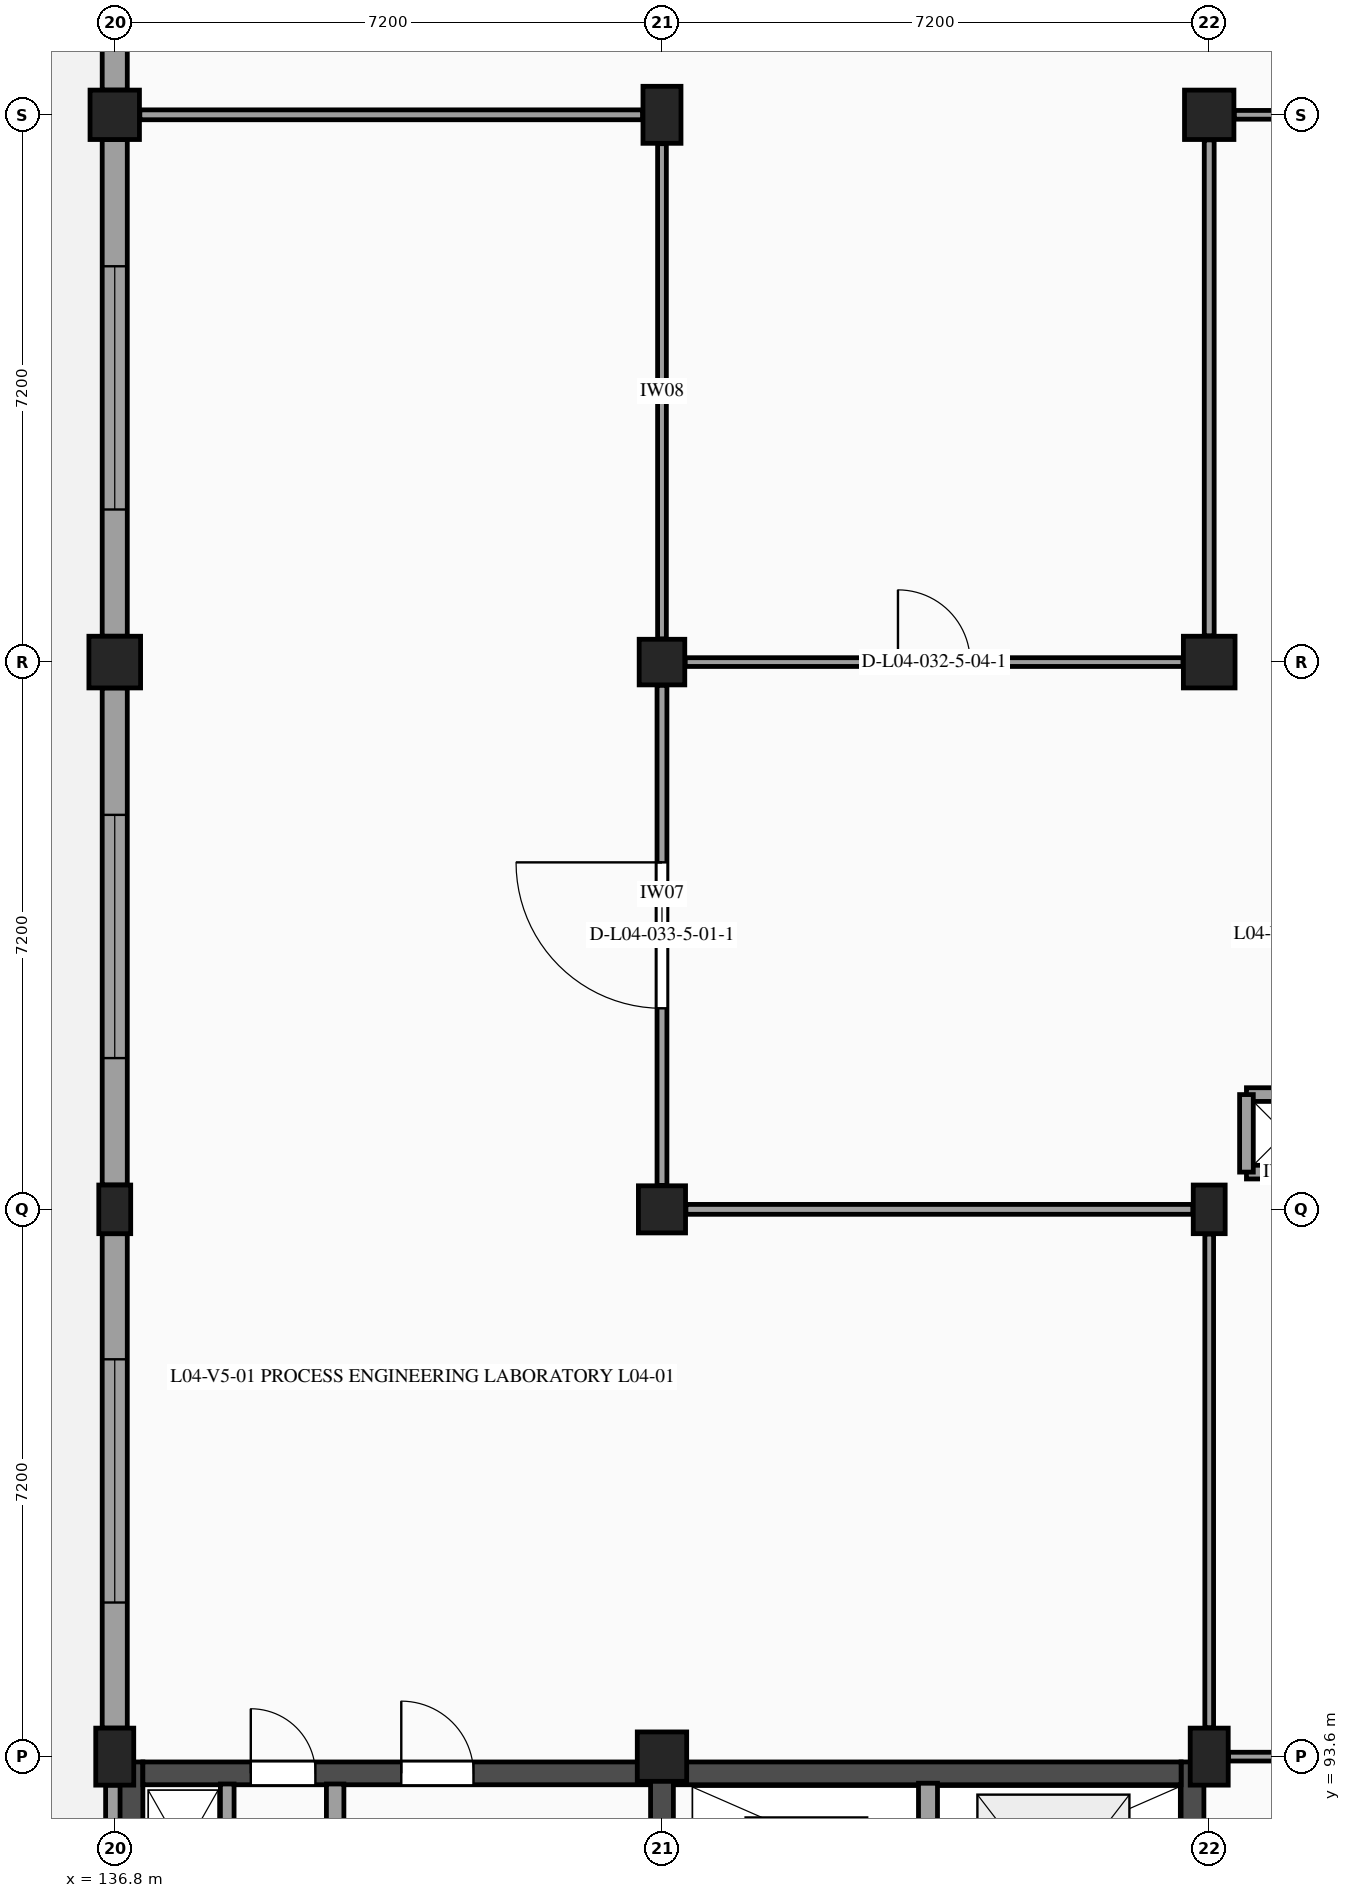
"""IFC4 building model, lengths in metres.
Left out: names, types, materials, properties, quantities, classifications, styles, units other than length and angle.
Written with IfcOpenShell. Run it as: python <this file> out.ifc"""

import sys

from ifc_helpers import new_model, si_unit, direction, frame, frame_2d, origin, origin_2d, place, context, subcontext, project, spatial, rectangle, extrude, element, fill, save


model = new_model("IFC4")
c1 = context("Model", 3, precision=1e-05, world=origin(), true_north=direction((0.0, 1.0)))
c2 = subcontext(c1, "Body", "Model", "MODEL_VIEW")
j1 = project(units=[si_unit("LENGTHUNIT", "METRE"), si_unit("PLANEANGLEUNIT", "RADIAN")], contexts=[c1])
p1 = place(None, origin())
s1 = spatial("IfcSite", under=j1, at=p1, CompositionType="ELEMENT")
p2 = place(p1, origin())
s2 = spatial("IfcBuilding", under=s1, at=p2, CompositionType="ELEMENT")
p3 = place(p2, frame((0.0, 0.0, 18.6)))
s3 = spatial("IfcBuildingStorey", under=s2, at=p3, CompositionType="ELEMENT", Elevation=18.6)
p4 = place(p3, frame((136.8, 93.6, 0.0), z_axis=(0.0, 0.0, 1.0), x_axis=(1.0, 0.0, 0.0)))
e1 = element("IfcColumn", 1, at=p4, inside=s3, PredefinedType="COLUMN", context=c2, shape_type="SweptSolid", body=[
    extrude(rectangle(XDim=0.5, YDim=0.75, at=origin_2d()), origin(), (0.0, 0.0, 1.0), 4.2),
])
p5 = place(p3, frame((136.8, 100.8, 0.0), z_axis=(0.0, 0.0, 1.0), x_axis=(1.0, 0.0, 0.0)))
e2 = element("IfcColumn", 2, at=p5, inside=s3, PredefinedType="PILASTER", context=c2, shape_type="SweptSolid", body=[
    extrude(rectangle(XDim=0.42, YDim=0.64, at=origin_2d()), origin(), (0.0, 0.0, 1.0), 4.2),
])
p6 = place(p3, frame((136.8, 108.0, 0.0), z_axis=(0.0, 0.0, 1.0), x_axis=(1.0, 0.0, 0.0)))
e3 = element("IfcColumn", 3, at=p6, inside=s3, PredefinedType="COLUMN", context=c2, shape_type="SweptSolid", body=[
    extrude(rectangle(XDim=0.68, YDim=0.68, at=origin_2d()), origin(), (0.0, 0.0, 1.0), 4.2),
])
for number, where, z_axis, x_axis in (
    (4, (136.8, 115.2, 0.0), (0.0, 0.0, 1.0), (1.0, 0.0, 0.0)),
    (5, (144.0, 93.6, 0.0), (0.0, 0.0, 1.0), (1.0, 0.0, 0.0)),
):
    element("IfcColumn", number, at=place(p3, frame(where, z_axis=z_axis, x_axis=x_axis)), inside=s3, PredefinedType="COLUMN", context=c2, shape_type="SweptSolid", body=[
        extrude(rectangle(XDim=0.65, YDim=0.65, at=origin_2d()), origin(), (0.0, 0.0, 1.0), 4.2),
    ])
p7 = place(p3, frame((144.0, 100.8, 0.0), z_axis=(0.0, 0.0, 1.0), x_axis=(1.0, 0.0, 0.0)))
e6 = element("IfcColumn", 6, at=p7, inside=s3, PredefinedType="COLUMN", context=c2, shape_type="SweptSolid", body=[
    extrude(rectangle(XDim=0.62, YDim=0.62, at=origin_2d()), origin(), (0.0, 0.0, 1.0), 4.2),
])
p8 = place(p3, frame((144.0, 108.0, 0.0), z_axis=(0.0, 0.0, 1.0), x_axis=(1.0, 0.0, 0.0)))
e7 = element("IfcColumn", 7, at=p8, inside=s3, PredefinedType="COLUMN", context=c2, shape_type="SweptSolid", body=[
    extrude(rectangle(XDim=0.6, YDim=0.6, at=origin_2d()), origin(), (0.0, 0.0, 1.0), 4.2),
])
for number, where, z_axis, x_axis in (
    (8, (144.0, 115.2, 0.0), (0.0, 0.0, 1.0), (1.0, 0.0, 0.0)),
    (9, (151.2, 93.6, 0.0), (0.0, 0.0, 1.0), (1.0, 0.0, 0.0)),
):
    element("IfcColumn", number, at=place(p3, frame(where, z_axis=z_axis, x_axis=x_axis)), inside=s3, PredefinedType="COLUMN", context=c2, shape_type="SweptSolid", body=[
        extrude(rectangle(XDim=0.5, YDim=0.75, at=origin_2d()), origin(), (0.0, 0.0, 1.0), 4.2),
    ])
p9 = place(p3, frame((151.2, 100.8, 0.0), z_axis=(0.0, 0.0, 1.0), x_axis=(1.0, 0.0, 0.0)))
e10 = element("IfcColumn", 10, at=p9, inside=s3, PredefinedType="PILASTER", context=c2, shape_type="SweptSolid", body=[
    extrude(rectangle(XDim=0.42, YDim=0.64, at=origin_2d()), origin(), (0.0, 0.0, 1.0), 4.2),
])
p10 = place(p3, frame((151.2, 108.0, 0.0), z_axis=(0.0, 0.0, 1.0), x_axis=(1.0, 0.0, 0.0)))
e11 = element("IfcColumn", 11, at=p10, inside=s3, PredefinedType="COLUMN", context=c2, shape_type="SweptSolid", body=[
    extrude(rectangle(XDim=0.68, YDim=0.68, at=origin_2d()), origin(), (0.0, 0.0, 1.0), 4.2),
])
p11 = place(p3, frame((151.2, 115.2, 0.0), z_axis=(0.0, 0.0, 1.0), x_axis=(1.0, 0.0, 0.0)))
e12 = element("IfcColumn", 12, at=p11, inside=s3, PredefinedType="COLUMN", context=c2, shape_type="SweptSolid", body=[
    extrude(rectangle(XDim=0.65, YDim=0.65, at=origin_2d()), origin(), (0.0, 0.0, 1.0), 4.2),
])
p12 = place(p3, frame((136.8, 115.525, 0.0), z_axis=(0.0, 0.0, 1.0), x_axis=(0.0, 1.0, 0.0)))
e13 = element("IfcWall", 13, at=p12, inside=s3, PredefinedType="STANDARD", context=c2, shape_type="SweptSolid", body=[
    extrude(rectangle(XDim=6.565, YDim=0.33, at=frame_2d((3.283, 0.0))), origin(), (0.0, 0.0, 1.0), 3.16),
])
p13 = place(p12, frame((2.583, 0.0, 0.0)))
e14 = element("IfcOpeningElement", 14, at=p13, cuts=e13, PredefinedType="OPENING", context=c2, shape_type="SweptSolid", body=[
    extrude(rectangle(XDim=1.4, YDim=2.25, at=frame_2d((0.7, 1.125))), frame((0.0, 0.175, 0.0), z_axis=(0.0, -1.0, 0.0), x_axis=(1.0, 0.0, 0.0)), (0.0, 0.0, 1.0), 0.35),
])
p14 = place(p3, frame((136.8, 86.7, 0.0), z_axis=(0.0, 0.0, 1.0), x_axis=(0.0, 1.0, 0.0)))
e15 = element("IfcWall", 15, at=p14, inside=s3, PredefinedType="STANDARD", context=c2, shape_type="SweptSolid", body=[
    extrude(rectangle(XDim=6.525, YDim=0.24, at=frame_2d((3.263, 0.0))), origin(), (0.0, 0.0, 1.0), 3.16),
])
p15 = place(p3, frame((136.8, 93.975, 0.0), z_axis=(0.0, 0.0, 1.0), x_axis=(0.0, 1.0, 0.0)))
e16 = element("IfcWall", 16, at=p15, inside=s3, PredefinedType="STANDARD", context=c2, shape_type="SweptSolid", body=[
    extrude(rectangle(XDim=6.505, YDim=0.33, at=frame_2d((3.252, 0.0))), origin(), (0.0, 0.0, 1.0), 3.16),
])
p16 = place(p15, frame((1.653, 0.0, 0.95)))
e17 = element("IfcOpeningElement", 17, at=p16, cuts=e16, PredefinedType="OPENING", context=c2, shape_type="SweptSolid", body=[
    extrude(rectangle(XDim=3.2, YDim=1.45, at=frame_2d((1.6, 0.725))), frame((0.0, 0.175, 0.0), z_axis=(0.0, -1.0, 0.0), x_axis=(1.0, 0.0, 0.0)), (0.0, 0.0, 1.0), 0.35),
])
p17 = place(p3, frame((136.8, 101.12, 0.0), z_axis=(0.0, 0.0, 1.0), x_axis=(0.0, 1.0, 0.0)))
e18 = element("IfcWall", 18, at=p17, inside=s3, PredefinedType="STANDARD", context=c2, shape_type="SweptSolid", body=[
    extrude(rectangle(XDim=6.54, YDim=0.33, at=frame_2d((3.27, 0.0))), origin(), (0.0, 0.0, 1.0), 3.16),
])
p18 = place(p17, frame((1.67, 0.0, 0.95)))
e19 = element("IfcOpeningElement", 19, at=p18, cuts=e18, PredefinedType="OPENING", context=c2, shape_type="SweptSolid", body=[
    extrude(rectangle(XDim=3.2, YDim=1.45, at=frame_2d((1.6, 0.725))), frame((0.0, 0.175, 0.0), z_axis=(0.0, -1.0, 0.0), x_axis=(1.0, 0.0, 0.0)), (0.0, 0.0, 1.0), 0.35),
])
p19 = place(p3, frame((136.8, 108.34, 0.0), z_axis=(0.0, 0.0, 1.0), x_axis=(0.0, 1.0, 0.0)))
e20 = element("IfcWall", 20, at=p19, inside=s3, PredefinedType="STANDARD", context=c2, shape_type="SweptSolid", body=[
    extrude(rectangle(XDim=6.535, YDim=0.33, at=frame_2d((3.268, 0.0))), origin(), (0.0, 0.0, 1.0), 3.16),
])
p20 = place(p19, frame((1.667, 0.0, 0.95)))
e21 = element("IfcOpeningElement", 21, at=p20, cuts=e20, PredefinedType="OPENING", context=c2, shape_type="SweptSolid", body=[
    extrude(rectangle(XDim=3.2, YDim=1.45, at=frame_2d((1.6, 0.725))), frame((0.0, 0.175, 0.0), z_axis=(0.0, -1.0, 0.0), x_axis=(1.0, 0.0, 0.0)), (0.0, 0.0, 1.0), 0.35),
])
p21 = place(p3, frame((137.02, 93.53, 0.0), z_axis=(0.0, 0.0, 1.0), x_axis=(0.0, -1.0, 0.0)))
e22 = element("IfcWall", 22, at=p21, inside=s3, PredefinedType="SHEAR", context=c2, shape_type="SweptSolid", body=[
    extrude(rectangle(XDim=7.06, YDim=0.3, at=frame_2d((3.53, 0.0))), origin(), (0.0, 0.0, 1.0), 3.955),
])
p22 = place(p3, frame((137.17, 93.38, 0.0), z_axis=(0.0, 0.0, 1.0), x_axis=(1.0, 0.0, 0.0)))
e23 = element("IfcWall", 23, at=p22, inside=s3, PredefinedType="SHEAR", context=c2, shape_type="SweptSolid", body=[
    extrude(rectangle(XDim=6.68, YDim=0.3, at=frame_2d((3.34, 0.0))), origin(), (0.0, 0.0, 1.0), 3.955),
])
p23 = place(p22, frame((1.42, 0.0, 0.0)))
e24 = element("IfcOpeningElement", 24, at=p23, cuts=e23, PredefinedType="OPENING", context=c2, shape_type="SweptSolid", body=[
    extrude(rectangle(XDim=0.85, YDim=2.1, at=frame_2d((0.425, 1.05))), frame((0.0, 0.16, 0.0), z_axis=(0.0, -1.0, 0.0), x_axis=(1.0, 0.0, 0.0)), (0.0, 0.0, 1.0), 0.32),
])
p24 = place(p22, frame((3.4, 0.0, 0.0)))
e25 = element("IfcOpeningElement", 25, at=p24, cuts=e23, PredefinedType="OPENING", context=c2, shape_type="SweptSolid", body=[
    extrude(rectangle(XDim=0.95, YDim=2.15, at=frame_2d((0.475, 1.075))), frame((0.0, 0.16, 0.0), z_axis=(0.0, -1.0, 0.0), x_axis=(1.0, 0.0, 0.0)), (0.0, 0.0, 1.0), 0.32),
])
p25 = place(p3, frame((139.7, 91.5, 0.0), z_axis=(0.0, 0.0, 1.0), x_axis=(0.0, 1.0, 0.0)))
e26 = element("IfcWall", 26, at=p25, inside=s3, PredefinedType="PARTITIONING", context=c2, shape_type="SweptSolid", body=[
    extrude(rectangle(XDim=1.74, YDim=0.23, at=frame_2d((0.87, 0.0))), origin(), (0.0, 0.0, 1.0), 3.955),
])
p26 = place(p3, frame((138.28, 91.48, 0.0), z_axis=(0.0, 0.0, 1.0), x_axis=(0.0, 1.0, 0.0)))
e27 = element("IfcWall", 27, at=p26, inside=s3, PredefinedType="PARTITIONING", context=c2, shape_type="SweptSolid", body=[
    extrude(rectangle(XDim=1.76, YDim=0.18, at=frame_2d((0.88, 0.0))), origin(), (0.0, 0.0, 1.0), 3.955),
])
p27 = place(p3, frame((144.0, 86.47, 0.0), z_axis=(0.0, 0.0, 1.0), x_axis=(0.0, 1.0, 0.0)))
e28 = element("IfcWall", 28, at=p27, inside=s3, PredefinedType="SHEAR", context=c2, shape_type="SweptSolid", body=[
    extrude(rectangle(XDim=7.06, YDim=0.3, at=frame_2d((3.53, 0.0))), origin(), (0.0, 0.0, 1.0), 3.955),
])
p28 = place(p27, frame((1.4, 0.0, 0.0)))
e29 = element("IfcOpeningElement", 29, at=p28, cuts=e28, PredefinedType="OPENING", context=c2, shape_type="SweptSolid", body=[
    extrude(rectangle(XDim=1.8, YDim=2.2, at=frame_2d((0.9, 1.1))), frame((0.0, 0.16, 0.0), z_axis=(0.0, -1.0, 0.0), x_axis=(1.0, 0.0, 0.0)), (0.0, 0.0, 1.0), 0.32),
])
p29 = place(p3, frame((150.98, 86.47, 0.0), z_axis=(0.0, 0.0, 1.0), x_axis=(0.0, 1.0, 0.0)))
e30 = element("IfcWall", 30, at=p29, inside=s3, PredefinedType="SHEAR", context=c2, shape_type="SweptSolid", body=[
    extrude(rectangle(XDim=7.06, YDim=0.3, at=frame_2d((3.53, 0.0))), origin(), (0.0, 0.0, 1.0), 3.955),
])
p30 = place(p3, frame((144.15, 93.38, 0.0), z_axis=(0.0, 0.0, 1.0), x_axis=(1.0, 0.0, 0.0)))
e31 = element("IfcWall", 31, at=p30, inside=s3, PredefinedType="SHEAR", context=c2, shape_type="SweptSolid", body=[
    extrude(rectangle(XDim=6.68, YDim=0.3, at=frame_2d((3.34, 0.0))), origin(), (0.0, 0.0, 1.0), 3.955),
])
p31 = place(p3, frame((147.5, 90.38, 0.0), z_axis=(0.0, 0.0, 1.0), x_axis=(0.0, 1.0, 0.0)))
e32 = element("IfcWall", 32, at=p31, inside=s3, PredefinedType="PARTITIONING", context=c2, shape_type="SweptSolid", body=[
    extrude(rectangle(XDim=2.87, YDim=0.25, at=frame_2d((1.435, 0.0))), origin(), (0.0, 0.0, 1.0), 3.955),
])
for number, where, z_axis, x_axis in (
    (33, (151.69, 101.29, 0.0), (0.0, 0.0, 1.0), (1.0, 0.0, 0.0)),
    (34, (152.71, 102.31, 0.0), (0.0, 0.0, 1.0), (-1.0, 0.0, 0.0)),
    (35, (151.69, 102.31, 0.0), (0.0, 0.0, 1.0), (0.0, -1.0, 0.0)),
):
    element("IfcWall", number, at=place(p3, frame(where, z_axis=z_axis, x_axis=x_axis)), inside=s3, PredefinedType="PARTITIONING", context=c2, shape_type="SweptSolid", body=[
        extrude(rectangle(XDim=1.02, YDim=0.18, at=frame_2d((0.51, 0.0))), origin(), (0.0, 0.0, 1.0), 3.955),
    ])
p32 = place(p3, frame((144.0, 101.115, 0.0), z_axis=(0.0, 0.0, 1.0), x_axis=(0.0, 1.0, 0.0)))
e36 = element("IfcWall", 36, at=p32, inside=s3, PredefinedType="PARTITIONING", context=c2, shape_type="SweptSolid", body=[
    extrude(rectangle(XDim=6.58, YDim=0.13, at=frame_2d((3.29, 0.0))), origin(), (0.0, 0.0, 1.0), 3.27),
])
p33 = place(p32, frame((2.33, 0.0, 0.0)))
e37 = element("IfcOpeningElement", 37, at=p33, cuts=e36, PredefinedType="OPENING", context=c2, shape_type="SweptSolid", body=[
    extrude(rectangle(XDim=1.92, YDim=2.35, at=frame_2d((0.96, 1.175))), frame((0.0, 0.075, 0.0), z_axis=(0.0, -1.0, 0.0), x_axis=(1.0, 0.0, 0.0)), (0.0, 0.0, 1.0), 0.15),
])
p34 = place(p3, frame((144.0, 108.305, 0.0), z_axis=(0.0, 0.0, 1.0), x_axis=(0.0, 1.0, 0.0)))
e38 = element("IfcWall", 38, at=p34, inside=s3, PredefinedType="PARTITIONING", context=c2, shape_type="SweptSolid", body=[
    extrude(rectangle(XDim=6.515, YDim=0.115, at=frame_2d((3.258, 0.0))), origin(), (0.0, 0.0, 1.0), 3.27),
])
p35 = place(p3, frame((137.13, 115.2, 0.0), z_axis=(0.0, 0.0, 1.0), x_axis=(1.0, 0.0, 0.0)))
e39 = element("IfcWall", 39, at=p35, inside=s3, PredefinedType="PARTITIONING", context=c2, shape_type="SweptSolid", body=[
    extrude(rectangle(XDim=6.615, YDim=0.13, at=frame_2d((3.308, 0.0))), origin(), (0.0, 0.0, 1.0), 3.24),
])
p36 = place(p3, frame((151.2, 93.98, 0.0), z_axis=(0.0, 0.0, 1.0), x_axis=(0.0, 1.0, 0.0)))
e40 = element("IfcWall", 40, at=p36, inside=s3, PredefinedType="PARTITIONING", context=c2, shape_type="SweptSolid", body=[
    extrude(rectangle(XDim=6.495, YDim=0.115, at=frame_2d((3.248, 0.0))), origin(), (0.0, 0.0, 1.0), 3.275),
])
p37 = place(p3, frame((144.315, 100.8, 0.0), z_axis=(0.0, 0.0, 1.0), x_axis=(1.0, 0.0, 0.0)))
e41 = element("IfcWall", 41, at=p37, inside=s3, PredefinedType="PARTITIONING", context=c2, shape_type="SweptSolid", body=[
    extrude(rectangle(XDim=6.67, YDim=0.13, at=frame_2d((3.335, 0.0))), origin(), (0.0, 0.0, 1.0), 3.245),
])
p38 = place(p3, frame((144.305, 108.0, 0.0), z_axis=(0.0, 0.0, 1.0), x_axis=(1.0, 0.0, 0.0)))
e42 = element("IfcWall", 42, at=p38, inside=s3, PredefinedType="PARTITIONING", context=c2, shape_type="SweptSolid", body=[
    extrude(rectangle(XDim=6.55, YDim=0.115, at=frame_2d((3.275, 0.0))), origin(), (0.0, 0.0, 1.0), 3.245),
])
p39 = place(p38, frame((2.8, 0.0, 0.0)))
e43 = element("IfcOpeningElement", 43, at=p39, cuts=e42, PredefinedType="OPENING", context=c2, shape_type="SweptSolid", body=[
    extrude(rectangle(XDim=0.95, YDim=2.15, at=frame_2d((0.475, 1.075))), frame((0.0, 0.067, 0.0), z_axis=(0.0, -1.0, 0.0), x_axis=(1.0, 0.0, 0.0)), (0.0, 0.0, 1.0), 0.135),
])
p40 = place(p3, frame((151.2, 108.345, 0.0), z_axis=(0.0, 0.0, 1.0), x_axis=(0.0, 1.0, 0.0)))
e44 = element("IfcWall", 44, at=p40, inside=s3, PredefinedType="PARTITIONING", context=c2, shape_type="SweptSolid", body=[
    extrude(rectangle(XDim=6.525, YDim=0.13, at=frame_2d((3.263, 0.0))), origin(), (0.0, 0.0, 1.0), 3.27),
])
for number, where, z_axis, x_axis in (
    (45, (151.455, 93.6, 0.0), (0.0, 0.0, 1.0), (1.0, 0.0, 0.0)),
    (46, (151.53, 115.2, 0.0), (0.0, 0.0, 1.0), (1.0, 0.0, 0.0)),
):
    element("IfcWall", number, at=place(p3, frame(where, z_axis=z_axis, x_axis=x_axis)), inside=s3, PredefinedType="PARTITIONING", context=c2, shape_type="SweptSolid", body=[
        extrude(rectangle(XDim=6.615, YDim=0.115, at=frame_2d((3.308, 0.0))), origin(), (0.0, 0.0, 1.0), 3.265),
    ])
p41 = place(p16, origin())
e47 = element("IfcWindow", 47, at=p41, inside=s3, PartitioningType="SINGLE_PANEL", PredefinedType="WINDOW", context=c2, shape_type="SweptSolid", body=[
    extrude(rectangle(XDim=3.2, YDim=1.45, at=frame_2d((1.6, 0.725))), frame((0.0, 0.03, 0.0), z_axis=(0.0, -1.0, 0.0), x_axis=(1.0, 0.0, 0.0)), (0.0, 0.0, 1.0), 0.06),
])
fill(e17, e47)
p42 = place(p18, origin())
e48 = element("IfcWindow", 48, at=p42, inside=s3, PartitioningType="SINGLE_PANEL", PredefinedType="WINDOW", context=c2, shape_type="SweptSolid", body=[
    extrude(rectangle(XDim=3.2, YDim=1.45, at=frame_2d((1.6, 0.725))), frame((0.0, 0.03, 0.0), z_axis=(0.0, -1.0, 0.0), x_axis=(1.0, 0.0, 0.0)), (0.0, 0.0, 1.0), 0.06),
])
fill(e19, e48)
p43 = place(p20, origin())
e49 = element("IfcWindow", 49, at=p43, inside=s3, PartitioningType="SINGLE_PANEL", PredefinedType="WINDOW", context=c2, shape_type="SweptSolid", body=[
    extrude(rectangle(XDim=3.2, YDim=1.45, at=frame_2d((1.6, 0.725))), frame((0.0, 0.03, 0.0), z_axis=(0.0, -1.0, 0.0), x_axis=(1.0, 0.0, 0.0)), (0.0, 0.0, 1.0), 0.06),
])
fill(e21, e49)
p44 = place(p23, origin())
e50 = element("IfcDoor", 50, at=p44, inside=s3, OperationType="SINGLE_SWING_LEFT", PredefinedType="DOOR", context=c2, shape_type="SweptSolid", body=[
    extrude(rectangle(XDim=0.85, YDim=2.1, at=frame_2d((0.425, 1.05))), frame((0.0, 0.025, 0.0), z_axis=(0.0, -1.0, 0.0), x_axis=(1.0, 0.0, 0.0)), (0.0, 0.0, 1.0), 0.05),
])
fill(e24, e50)
p45 = place(p24, origin())
e51 = element("IfcDoor", 51, at=p45, inside=s3, OperationType="SINGLE_SWING_LEFT", PredefinedType="DOOR", context=c2, shape_type="SweptSolid", body=[
    extrude(rectangle(XDim=0.95, YDim=2.15, at=frame_2d((0.475, 1.075))), frame((0.0, 0.025, 0.0), z_axis=(0.0, -1.0, 0.0), x_axis=(1.0, 0.0, 0.0)), (0.0, 0.0, 1.0), 0.05),
])
fill(e25, e51)
p46 = place(p39, origin())
e52 = element("IfcDoor", 52, at=p46, inside=s3, OperationType="SINGLE_SWING_LEFT", PredefinedType="DOOR", context=c2, shape_type="SweptSolid", body=[
    extrude(rectangle(XDim=0.95, YDim=2.15, at=frame_2d((0.475, 1.075))), frame((0.0, 0.025, 0.0), z_axis=(0.0, -1.0, 0.0), x_axis=(1.0, 0.0, 0.0)), (0.0, 0.0, 1.0), 0.05),
])
fill(e43, e52)
p47 = place(p33, origin())
e53 = element("IfcDoor", 53, at=p47, inside=s3, OperationType="SINGLE_SWING_RIGHT", PredefinedType="DOOR", context=c2, shape_type="SweptSolid", body=[
    extrude(rectangle(XDim=1.92, YDim=2.35, at=frame_2d((0.96, 1.175))), frame((0.0, 0.025, 0.0), z_axis=(0.0, -1.0, 0.0), x_axis=(1.0, 0.0, 0.0)), (0.0, 0.0, 1.0), 0.05),
])
fill(e37, e53)
save(model, sys.argv[1])
